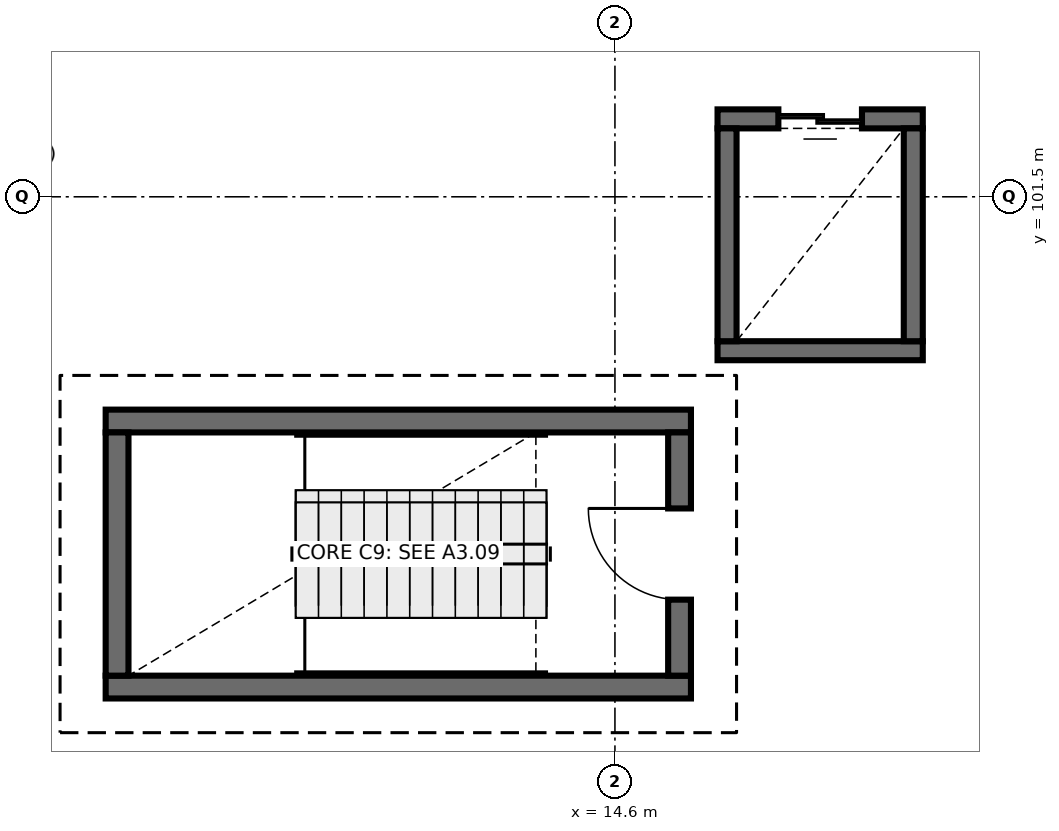
"""IFC4 building model, lengths in metres.
Left out: names, types, materials, properties, quantities, classifications, styles, units other than length and angle.
Written with IfcOpenShell. Run it as: python <this file> out.ifc"""

import sys

from ifc_helpers import new_model, si_unit, direction, frame, frame_2d, origin, place, context, subcontext, project, spatial, rectangle, extrude, element, fill, save


model = new_model("IFC4")
c1 = context("Model", 3, precision=1e-05, world=origin(), true_north=direction((0.0, 1.0)))
c2 = subcontext(c1, "Body", "Model", "MODEL_VIEW")
j1 = project(units=[si_unit("LENGTHUNIT", "METRE"), si_unit("PLANEANGLEUNIT", "RADIAN")], contexts=[c1])
p1 = place(None, origin())
s1 = spatial("IfcSite", under=j1, at=p1, CompositionType="ELEMENT")
p2 = place(p1, origin())
s2 = spatial("IfcBuilding", under=s1, at=p2, CompositionType="ELEMENT")
p3 = place(p2, frame((0.0, 0.0, 18.3)))
s3 = spatial("IfcBuildingStorey", under=s2, at=p3, CompositionType="ELEMENT", Elevation=18.3)
for number, where, z_axis, x_axis in (
    (1, (7.9, 95.05, 0.0), (0.0, 0.0, 1.0), (1.0, 0.0, 0.0)),
    (2, (15.6, 98.55, 0.0), (0.0, 0.0, 1.0), (-1.0, 0.0, 0.0)),
):
    element("IfcWall", number, at=place(p3, frame(where, z_axis=z_axis, x_axis=x_axis)), inside=s3, PredefinedType="SHEAR", context=c2, shape_type="SweptSolid", body=[
        extrude(rectangle(XDim=7.7, YDim=0.3, at=frame_2d((3.85, 0.0))), origin(), (0.0, 0.0, 1.0), 4.5),
    ])
p4 = place(p3, frame((8.05, 98.4, 0.0), z_axis=(0.0, 0.0, 1.0), x_axis=(0.0, -1.0, 0.0)))
e3 = element("IfcWall", 3, at=p4, inside=s3, PredefinedType="SHEAR", context=c2, shape_type="SweptSolid", body=[
    extrude(rectangle(XDim=3.2, YDim=0.3, at=frame_2d((1.6, 0.0))), origin(), (0.0, 0.0, 1.0), 4.5),
])
p5 = place(p3, frame((15.45, 95.2, 0.0), z_axis=(0.0, 0.0, 1.0), x_axis=(0.0, 1.0, 0.0)))
e4 = element("IfcWall", 4, at=p5, inside=s3, PredefinedType="SHEAR", context=c2, shape_type="SweptSolid", body=[
    extrude(rectangle(XDim=3.2, YDim=0.3, at=frame_2d((1.6, 0.0))), origin(), (0.0, 0.0, 1.0), 4.5),
])
p6 = place(p5, frame((1.0, 0.0, 0.0)))
e5 = element("IfcOpeningElement", 5, at=p6, cuts=e4, PredefinedType="OPENING", context=c2, shape_type="SweptSolid", body=[
    extrude(rectangle(XDim=1.2, YDim=2.15, at=frame_2d((0.6, 1.075))), frame((0.0, 0.16, 0.0), z_axis=(0.0, -1.0, 0.0), x_axis=(1.0, 0.0, 0.0)), (0.0, 0.0, 1.0), 0.32),
])
p7 = place(p3, frame((15.95, 99.475, 0.0), z_axis=(0.0, 0.0, 1.0), x_axis=(1.0, 0.0, 0.0)))
e6 = element("IfcWall", 6, at=p7, inside=s3, PredefinedType="SHEAR", context=c2, shape_type="SweptSolid", body=[
    extrude(rectangle(XDim=2.7, YDim=0.25, at=frame_2d((1.35, 0.0))), origin(), (0.0, 0.0, 1.0), 4.5),
])
p8 = place(p3, frame((18.65, 102.525, 0.0), z_axis=(0.0, 0.0, 1.0), x_axis=(-1.0, 0.0, 0.0)))
e7 = element("IfcWall", 7, at=p8, inside=s3, PredefinedType="SHEAR", context=c2, shape_type="SweptSolid", body=[
    extrude(rectangle(XDim=2.7, YDim=0.25, at=frame_2d((1.35, 0.0))), origin(), (0.0, 0.0, 1.0), 4.5),
])
p9 = place(p8, frame((0.8, 0.0, 0.0)))
e8 = element("IfcOpeningElement", 8, at=p9, cuts=e7, PredefinedType="OPENING", context=c2, shape_type="SweptSolid", body=[
    extrude(rectangle(XDim=1.1, YDim=2.15, at=frame_2d((0.55, 1.075))), frame((0.0, 0.135, 0.0), z_axis=(0.0, -1.0, 0.0), x_axis=(1.0, 0.0, 0.0)), (0.0, 0.0, 1.0), 0.27),
])
for number, where, z_axis, x_axis in (
    (9, (16.075, 102.4, 0.0), (0.0, 0.0, 1.0), (0.0, -1.0, 0.0)),
    (10, (18.525, 99.6, 0.0), (0.0, 0.0, 1.0), (0.0, 1.0, 0.0)),
):
    element("IfcWall", number, at=place(p3, frame(where, z_axis=z_axis, x_axis=x_axis)), inside=s3, PredefinedType="SHEAR", context=c2, shape_type="SweptSolid", body=[
        extrude(rectangle(XDim=2.8, YDim=0.25, at=frame_2d((1.4, 0.0))), origin(), (0.0, 0.0, 1.0), 4.5),
    ])
p10 = place(p6, origin())
e11 = element("IfcDoor", 11, at=p10, inside=s3, OperationType="SINGLE_SWING_RIGHT", PredefinedType="DOOR", context=c2, shape_type="SweptSolid", body=[
    extrude(rectangle(XDim=1.2, YDim=2.15, at=frame_2d((0.6, 1.075))), frame((0.0, 0.025, 0.0), z_axis=(0.0, -1.0, 0.0), x_axis=(1.0, 0.0, 0.0)), (0.0, 0.0, 1.0), 0.05),
])
fill(e5, e11)
p11 = place(p9, origin())
e12 = element("IfcDoor", 12, at=p11, inside=s3, OperationType="DOUBLE_DOOR_SLIDING", PredefinedType="DOOR", context=c2, shape_type="SweptSolid", body=[
    extrude(rectangle(XDim=1.1, YDim=2.15, at=frame_2d((0.55, 1.075))), frame((0.0, 0.025, 0.0), z_axis=(0.0, -1.0, 0.0), x_axis=(1.0, 0.0, 0.0)), (0.0, 0.0, 1.0), 0.05),
])
fill(e8, e12)
save(model, sys.argv[1])
